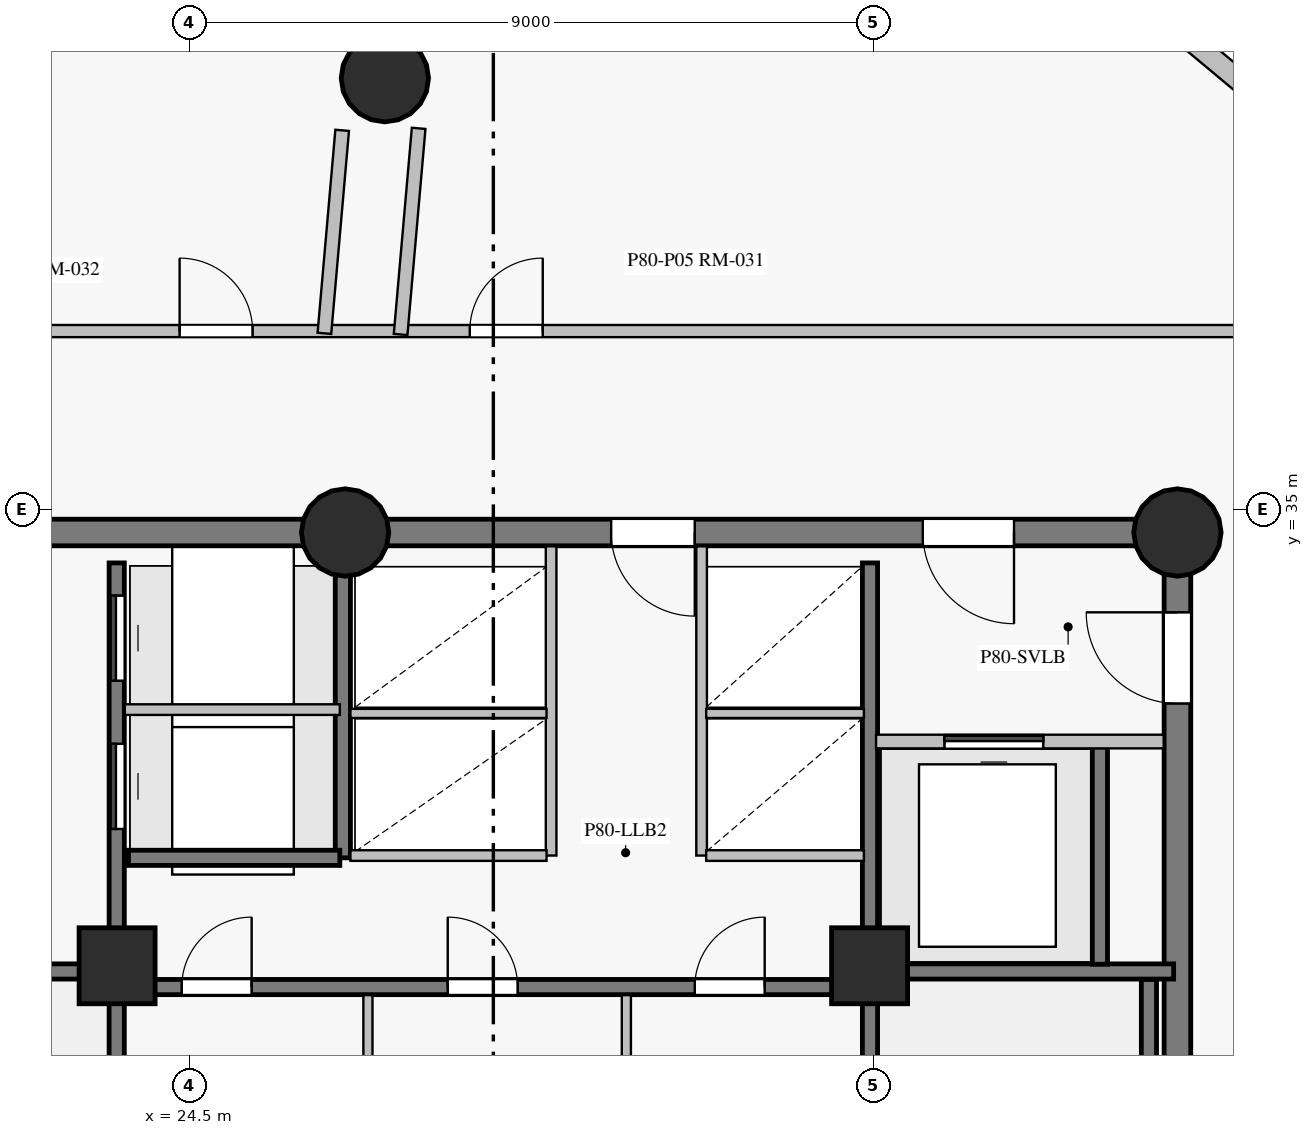
"""IFC4 building model, lengths in metres.
Left out: names, types, materials, properties, quantities, classifications, styles, units other than length and angle.
Written with IfcOpenShell. Run it as: python <this file> out.ifc"""

import sys

from ifc_helpers import new_model, si_unit, direction, frame, frame_2d, origin, origin_with_axes, origin_2d, place, context, subcontext, project, spatial, rectangle, circle, extrude, source, transform, mapped, element, fill, save


model = new_model("IFC4")
c1 = context("Model", 3, precision=1e-05, world=origin(), true_north=direction((0.0, 1.0)))
c2 = subcontext(c1, "Body", "Model", "MODEL_VIEW")
j1 = project(units=[si_unit("LENGTHUNIT", "METRE"), si_unit("PLANEANGLEUNIT", "RADIAN")], contexts=[c1])
p1 = place(None, origin())
s1 = spatial("IfcSite", under=j1, at=p1, CompositionType="ELEMENT")
p2 = place(p1, origin())
s2 = spatial("IfcBuilding", under=s1, at=p2, CompositionType="ELEMENT")
p3 = place(p2, frame((0.0, 0.0, 268.75)))
s3 = spatial("IfcBuildingStorey", under=s2, at=p3, CompositionType="ELEMENT", Elevation=268.75)
p4 = place(p3, frame((37.5, 18.3, 0.0), z_axis=(0.0, 0.0, 1.0), x_axis=(0.0, 1.0, 0.0)))
e1 = element("IfcWall", 1, at=p4, inside=s3, PredefinedType="SHEAR", context=c2, shape_type="SweptSolid", body=[
    extrude(rectangle(XDim=16.4, YDim=0.35, at=frame_2d((8.2, 0.0))), origin(), (0.0, 0.0, 1.0), 4.375),
])
p5 = place(p4, frame((14.15, 0.0, 0.0)))
e2 = element("IfcOpeningElement", 2, at=p5, cuts=e1, PredefinedType="OPENING", context=c2, shape_type="SweptSolid", body=[
    extrude(rectangle(XDim=1.2, YDim=2.15, at=frame_2d((0.6, 1.075))), frame((0.0, 0.185, 0.0), z_axis=(0.0, -1.0, 0.0), x_axis=(1.0, 0.0, 0.0)), (0.0, 0.0, 1.0), 0.37),
])
p6 = place(p3, frame((37.5, 34.7, 0.0), z_axis=(0.0, 0.0, 1.0), x_axis=(-1.0, 0.0, 0.0)))
e3 = element("IfcWall", 3, at=p6, inside=s3, PredefinedType="SHEAR", context=c2, shape_type="SweptSolid", body=[
    extrude(rectangle(XDim=10.95, YDim=0.35, at=frame_2d((5.475, 0.0))), origin(), (0.0, 0.0, 1.0), 4.375),
])
p7 = place(p6, frame((2.15, 0.0, 0.0)))
e4 = element("IfcOpeningElement", 4, at=p7, cuts=e3, PredefinedType="OPENING", context=c2, shape_type="SweptSolid", body=[
    extrude(rectangle(XDim=1.2, YDim=2.15, at=frame_2d((0.6, 1.075))), frame((0.0, 0.185, 0.0), z_axis=(0.0, -1.0, 0.0), x_axis=(1.0, 0.0, 0.0)), (0.0, 0.0, 1.0), 0.37),
])
p8 = place(p6, frame((6.35, 0.0, 0.0)))
e5 = element("IfcOpeningElement", 5, at=p8, cuts=e3, PredefinedType="OPENING", context=c2, shape_type="SweptSolid", body=[
    extrude(rectangle(XDim=1.1, YDim=2.15, at=frame_2d((0.55, 1.075))), frame((0.0, 0.185, 0.0), z_axis=(0.0, -1.0, 0.0), x_axis=(1.0, 0.0, 0.0)), (0.0, 0.0, 1.0), 0.37),
])
p9 = place(p3, frame((26.55, 34.7, 0.0), z_axis=(0.0, 0.0, 1.0), x_axis=(-1.0, 0.0, 0.0)))
e6 = element("IfcWall", 6, at=p9, inside=s3, PredefinedType="SHEAR", context=c2, shape_type="SweptSolid", body=[
    extrude(rectangle(XDim=7.05, YDim=0.35, at=frame_2d((3.525, 0.0))), origin(), (0.0, 0.0, 1.0), 4.375),
])
p10 = place(p9, frame((4.25, 0.0, 0.0)))
e7 = element("IfcOpeningElement", 7, at=p10, cuts=e6, PredefinedType="OPENING", context=c2, shape_type="SweptSolid", body=[
    extrude(rectangle(XDim=1.1, YDim=2.15, at=frame_2d((0.55, 1.075))), frame((0.0, 0.185, 0.0), z_axis=(0.0, -1.0, 0.0), x_axis=(1.0, 0.0, 0.0)), (0.0, 0.0, 1.0), 0.37),
])
m1 = source(origin_with_axes(), c2, "Body", "SweptSolid", [
    extrude(circle(Radius=0.575, at=origin_2d()), origin(), (0.0, 0.0, 1.0), 4.65),
])
for number, where, z_axis, x_axis in (
    (8, (26.55, 34.7, 0.0), (0.0, 0.0, 1.0), (1.0, 0.0, 0.0)),
    (9, (37.5, 34.7, 0.0), (0.0, 0.0, 1.0), (1.0, 0.0, 0.0)),
):
    element("IfcColumn", number, at=place(p3, frame(where, z_axis=z_axis, x_axis=x_axis)), inside=s3, PredefinedType="COLUMN", context=c2, shape_type="MappedRepresentation", body=[
        mapped(m1, transform((0.0, 0.0, 0.0), scale=1.0)),
    ])
m2 = source(origin_with_axes(), c2, "Body", "SweptSolid", [
    extrude(rectangle(XDim=1.0, YDim=1.0, at=origin_2d()), origin(), (0.0, 0.0, 1.0), 4.65),
])
for number, where, z_axis, x_axis in (
    (10, (23.55, 29.0, 0.0), (0.0, 0.0, 1.0), (1.0, 0.0, 0.0)),
    (11, (33.45, 29.0, 0.0), (0.0, 0.0, 1.0), (1.0, 0.0, 0.0)),
):
    element("IfcColumn", number, at=place(p3, frame(where, z_axis=z_axis, x_axis=x_axis)), inside=s3, PredefinedType="COLUMN", context=c2, shape_type="MappedRepresentation", body=[
        mapped(m2, transform((0.0, 0.0, 0.0), scale=1.0)),
    ])
p11 = place(p3, frame((27.073, 40.677, 0.0), z_axis=(0.0, 0.0, 1.0), x_axis=(1.0, 0.0, 0.0)))
e12 = element("IfcColumn", 12, at=p11, inside=s3, PredefinedType="COLUMN", context=c2, shape_type="MappedRepresentation", body=[
    mapped(m1, transform((0.0, 0.0, 0.0), scale=1.0)),
])
p12 = place(p3, frame((40.725, 38.631, 0.0), z_axis=(0.0, 0.0, 1.0), x_axis=(-0.767612607464, 0.640914101001, 0.0)))
e13 = element("IfcWall", 13, at=p12, inside=s3, PredefinedType="SOLIDWALL", context=c2, shape_type="SweptSolid", body=[
    extrude(rectangle(XDim=10.099, YDim=0.28, at=frame_2d((5.05, 0.0))), origin(), (0.0, 0.0, 1.0), 4.375),
])
p13 = place(p3, frame((24.393, 44.071, 0.0), z_axis=(0.0, 0.0, 1.0), x_axis=(-0.79188114586, -0.610675241706, 0.0)))
e14 = element("IfcWall", 14, at=p13, inside=s3, PredefinedType="SOLIDWALL", context=c2, shape_type="SweptSolid", body=[
    extrude(rectangle(XDim=11.836, YDim=0.28, at=frame_2d((5.918, 0.0))), origin(), (0.0, 0.0, 1.0), 4.375),
])
p14 = place(p3, frame((23.545, 18.7, 0.0), z_axis=(0.0, 0.0, 1.0), x_axis=(0.0, 1.0, 0.0)))
e15 = element("IfcWall", 15, at=p14, inside=s3, PredefinedType="SHEAR", context=c2, shape_type="SweptSolid", body=[
    extrude(rectangle(XDim=15.6, YDim=0.2, at=frame_2d((7.8, 0.0))), origin(), (0.0, 0.0, 1.0), 4.375),
])
p15 = place(p14, frame((2.75, 0.0, 0.0)))
e16 = element("IfcOpeningElement", 16, at=p15, cuts=e15, PredefinedType="OPENING", context=c2, shape_type="SweptSolid", body=[
    extrude(rectangle(XDim=1.15, YDim=2.15, at=frame_2d((0.575, 1.075))), frame((0.0, 0.11, 0.0), z_axis=(0.0, -1.0, 0.0), x_axis=(1.0, 0.0, 0.0)), (0.0, 0.0, 1.0), 0.22),
])
p16 = place(p14, frame((0.14, 0.0, 0.0)))
e17 = element("IfcOpeningElement", 17, at=p16, cuts=e15, PredefinedType="OPENING", context=c2, shape_type="SweptSolid", body=[
    extrude(rectangle(XDim=0.88, YDim=2.1, at=frame_2d((0.44, 1.05))), frame((0.0, 0.11, 0.0), z_axis=(0.0, -1.0, 0.0), x_axis=(1.0, 0.0, 0.0)), (0.0, 0.0, 1.0), 0.22),
])
p17 = place(p14, frame((1.36, 0.0, 0.0)))
e18 = element("IfcOpeningElement", 18, at=p17, cuts=e15, PredefinedType="OPENING", context=c2, shape_type="SweptSolid", body=[
    extrude(rectangle(XDim=0.88, YDim=2.1, at=frame_2d((0.44, 1.05))), frame((0.0, 0.11, 0.0), z_axis=(0.0, -1.0, 0.0), x_axis=(1.0, 0.0, 0.0)), (0.0, 0.0, 1.0), 0.22),
])
p18 = place(p14, frame((12.1, 0.0, 0.0)))
e19 = element("IfcOpeningElement", 19, at=p18, cuts=e15, PredefinedType="OPENING", context=c2, shape_type="SweptSolid", body=[
    extrude(rectangle(XDim=1.12, YDim=2.15, at=frame_2d((0.56, 1.075))), frame((0.0, 0.11, 0.0), z_axis=(0.0, -1.0, 0.0), x_axis=(1.0, 0.0, 0.0)), (0.0, 0.0, 1.0), 0.22),
])
p19 = place(p14, frame((14.05, 0.0, 0.0)))
e20 = element("IfcOpeningElement", 20, at=p19, cuts=e15, PredefinedType="OPENING", context=c2, shape_type="SweptSolid", body=[
    extrude(rectangle(XDim=1.12, YDim=2.15, at=frame_2d((0.56, 1.075))), frame((0.0, 0.11, 0.0), z_axis=(0.0, -1.0, 0.0), x_axis=(1.0, 0.0, 0.0)), (0.0, 0.0, 1.0), 0.22),
])
p20 = place(p3, frame((33.455, 18.7, 0.0), z_axis=(0.0, 0.0, 1.0), x_axis=(0.0, 1.0, 0.0)))
e21 = element("IfcWall", 21, at=p20, inside=s3, PredefinedType="SHEAR", context=c2, shape_type="SweptSolid", body=[
    extrude(rectangle(XDim=15.6, YDim=0.2, at=frame_2d((7.8, 0.0))), origin(), (0.0, 0.0, 1.0), 4.375),
])
p21 = place(p20, frame((2.75, 0.0, 0.0)))
e22 = element("IfcOpeningElement", 22, at=p21, cuts=e21, PredefinedType="OPENING", context=c2, shape_type="SweptSolid", body=[
    extrude(rectangle(XDim=1.15, YDim=2.15, at=frame_2d((0.575, 1.075))), frame((0.0, 0.11, 0.0), z_axis=(0.0, -1.0, 0.0), x_axis=(1.0, 0.0, 0.0)), (0.0, 0.0, 1.0), 0.22),
])
p22 = place(p20, frame((0.55, 0.0, 0.0)))
e23 = element("IfcOpeningElement", 23, at=p22, cuts=e21, PredefinedType="OPENING", context=c2, shape_type="SweptSolid", body=[
    extrude(rectangle(XDim=0.94, YDim=2.1, at=frame_2d((0.47, 1.05))), frame((0.0, 0.11, 0.0), z_axis=(0.0, -1.0, 0.0), x_axis=(1.0, 0.0, 0.0)), (0.0, 0.0, 1.0), 0.22),
])
p23 = place(p3, frame((23.7, 28.72, 0.0), z_axis=(0.0, 0.0, 1.0), x_axis=(1.0, 0.0, 0.0)))
e24 = element("IfcWall", 24, at=p23, inside=s3, PredefinedType="SHEAR", context=c2, shape_type="SweptSolid", body=[
    extrude(rectangle(XDim=9.6, YDim=0.2, at=frame_2d((4.8, 0.0))), origin(), (0.0, 0.0, 1.0), 4.375),
])
p24 = place(p23, frame((0.7, 0.0, 0.0)))
e25 = element("IfcOpeningElement", 25, at=p24, cuts=e24, PredefinedType="OPENING", context=c2, shape_type="SweptSolid", body=[
    extrude(rectangle(XDim=0.92, YDim=2.1, at=frame_2d((0.46, 1.05))), frame((0.0, 0.11, 0.0), z_axis=(0.0, -1.0, 0.0), x_axis=(1.0, 0.0, 0.0)), (0.0, 0.0, 1.0), 0.22),
])
p25 = place(p23, frame((4.2, 0.0, 0.0)))
e26 = element("IfcOpeningElement", 26, at=p25, cuts=e24, PredefinedType="OPENING", context=c2, shape_type="SweptSolid", body=[
    extrude(rectangle(XDim=0.92, YDim=2.1, at=frame_2d((0.46, 1.05))), frame((0.0, 0.11, 0.0), z_axis=(0.0, -1.0, 0.0), x_axis=(1.0, 0.0, 0.0)), (0.0, 0.0, 1.0), 0.22),
])
p26 = place(p23, frame((7.45, 0.0, 0.0)))
e27 = element("IfcOpeningElement", 27, at=p26, cuts=e24, PredefinedType="OPENING", context=c2, shape_type="SweptSolid", body=[
    extrude(rectangle(XDim=0.92, YDim=2.1, at=frame_2d((0.46, 1.05))), frame((0.0, 0.11, 0.0), z_axis=(0.0, -1.0, 0.0), x_axis=(1.0, 0.0, 0.0)), (0.0, 0.0, 1.0), 0.22),
])
p27 = place(p3, frame((37.125, 21.32, 0.0), z_axis=(0.0, 0.0, 1.0), x_axis=(0.0, 1.0, 0.0)))
e28 = element("IfcWall", 28, at=p27, inside=s3, PredefinedType="SHEAR", context=c2, shape_type="SweptSolid", body=[
    extrude(rectangle(XDim=7.5, YDim=0.2, at=frame_2d((3.75, 0.0))), origin(), (0.0, 0.0, 1.0), 4.375),
])
for number, where, z_axis, x_axis in (
    (29, (33.455, 28.925, 0.0), (0.0, 0.0, 1.0), (1.0, 0.0, 0.0)),
    (30, (19.55, 28.925, 0.0), (0.0, 0.0, 1.0), (1.0, 0.0, 0.0)),
):
    element("IfcWall", number, at=place(p3, frame(where, z_axis=z_axis, x_axis=x_axis)), inside=s3, PredefinedType="SHEAR", context=c2, shape_type="SweptSolid", body=[
        extrude(rectangle(XDim=3.995, YDim=0.2, at=frame_2d((1.998, 0.0))), origin(), (0.0, 0.0, 1.0), 4.375),
    ])
p28 = place(p3, frame((26.52, 30.42, 0.0), z_axis=(0.0, 0.0, 1.0), x_axis=(0.0, 1.0, 0.0)))
e31 = element("IfcWall", 31, at=p28, inside=s3, PredefinedType="SHEAR", context=c2, shape_type="SweptSolid", body=[
    extrude(rectangle(XDim=3.86, YDim=0.2, at=frame_2d((1.93, 0.0))), origin(), (0.0, 0.0, 1.0), 4.375),
])
p29 = place(p3, frame((36.48, 29.02, 0.0), z_axis=(0.0, 0.0, 1.0), x_axis=(0.0, 1.0, 0.0)))
e32 = element("IfcWall", 32, at=p29, inside=s3, PredefinedType="SHEAR", context=c2, shape_type="SweptSolid", body=[
    extrude(rectangle(XDim=2.86, YDim=0.2, at=frame_2d((1.43, 0.0))), origin(), (0.0, 0.0, 1.0), 4.375),
])
p30 = place(p3, frame((23.7, 30.42, 0.0), z_axis=(0.0, 0.0, 1.0), x_axis=(1.0, 0.0, 0.0)))
e33 = element("IfcWall", 33, at=p30, inside=s3, PredefinedType="SHEAR", context=c2, shape_type="SweptSolid", body=[
    extrude(rectangle(XDim=2.78, YDim=0.2, at=frame_2d((1.39, 0.0))), origin(), (0.0, 0.0, 1.0), 4.375),
])
p31 = place(p3, frame((16.5, 37.35, 0.0), z_axis=(0.0, 0.0, 1.0), x_axis=(1.0, 0.0, 0.0)))
e34 = element("IfcWall", 34, at=p31, inside=s3, PredefinedType="PARTITIONING", context=c2, shape_type="SweptSolid", body=[
    extrude(rectangle(XDim=23.85, YDim=0.16, at=frame_2d((11.925, 0.0))), origin(), (0.0, 0.0, 1.0), 3.475),
])
p32 = place(p31, frame((11.69, 0.0, 0.0)))
e35 = element("IfcOpeningElement", 35, at=p32, cuts=e34, PredefinedType="OPENING", context=c2, shape_type="SweptSolid", body=[
    extrude(rectangle(XDim=0.96, YDim=2.15, at=frame_2d((0.48, 1.075))), frame((0.0, 0.09, 0.0), z_axis=(0.0, -1.0, 0.0), x_axis=(1.0, 0.0, 0.0)), (0.0, 0.0, 1.0), 0.18),
])
p33 = place(p31, frame((7.873, 0.0, 0.0)))
e36 = element("IfcOpeningElement", 36, at=p33, cuts=e34, PredefinedType="OPENING", context=c2, shape_type="SweptSolid", body=[
    extrude(rectangle(XDim=0.96, YDim=2.15, at=frame_2d((0.48, 1.075))), frame((0.0, 0.09, 0.0), z_axis=(0.0, -1.0, 0.0), x_axis=(1.0, 0.0, 0.0)), (0.0, 0.0, 1.0), 0.18),
])
for number, where, z_axis, x_axis in (
    (37, (29.26, 30.45, 0.0), (0.0, 0.0, 1.0), (0.0, 1.0, 0.0)),
    (38, (31.24, 30.45, 0.0), (0.0, 0.0, 1.0), (0.0, 1.0, 0.0)),
):
    element("IfcWall", number, at=place(p3, frame(where, z_axis=z_axis, x_axis=x_axis)), inside=s3, PredefinedType="PARTITIONING", context=c2, shape_type="SweptSolid", body=[
        extrude(rectangle(XDim=4.068, YDim=0.14, at=frame_2d((2.034, 0.0))), origin(), (0.0, 0.0, 1.0), 4.375),
    ])
p34 = place(p3, frame((33.535, 31.95, 0.0), z_axis=(0.0, 0.0, 1.0), x_axis=(1.0, 0.0, 0.0)))
e39 = element("IfcWall", 39, at=p34, inside=s3, PredefinedType="PARTITIONING", context=c2, shape_type="SweptSolid", body=[
    extrude(rectangle(XDim=3.784, YDim=0.18, at=frame_2d((1.892, 0.0))), origin(), (0.0, 0.0, 1.0), 4.375),
])
p35 = place(p34, frame((0.9, 0.0, 0.0)))
e40 = element("IfcOpeningElement", 40, at=p35, cuts=e39, PredefinedType="OPENING", context=c2, shape_type="SweptSolid", body=[
    extrude(rectangle(XDim=1.3, YDim=2.2, at=frame_2d((0.65, 1.1))), frame((0.0, 0.1, 0.0), z_axis=(0.0, -1.0, 0.0), x_axis=(1.0, 0.0, 0.0)), (0.0, 0.0, 1.0), 0.2),
])
p36 = place(p3, frame((23.652, 32.37, 0.0), z_axis=(0.0, 0.0, 1.0), x_axis=(1.0, 0.0, 0.0)))
e41 = element("IfcWall", 41, at=p36, inside=s3, PredefinedType="PARTITIONING", context=c2, shape_type="SweptSolid", body=[
    extrude(rectangle(XDim=2.828, YDim=0.14, at=frame_2d((1.414, 0.0))), origin(), (0.0, 0.0, 1.0), 4.375),
])
p37 = place(p3, frame((27.28, 37.305, 0.0), z_axis=(0.0, 0.0, 1.0), x_axis=(0.087171400335, 0.996193328106, 0.0)))
e42 = element("IfcWall", 42, at=p37, inside=s3, PredefinedType="PARTITIONING", context=c2, shape_type="SweptSolid", body=[
    extrude(rectangle(XDim=2.722, YDim=0.18, at=frame_2d((1.361, 0.0))), origin(), (0.0, 0.0, 1.0), 3.475),
])
p38 = place(p3, frame((26.511, 39.991, 0.0), z_axis=(0.0, 0.0, 1.0), x_axis=(-0.087144358245, -0.996195694041, 0.0)))
e43 = element("IfcWall", 43, at=p38, inside=s3, PredefinedType="PARTITIONING", context=c2, shape_type="SweptSolid", body=[
    extrude(rectangle(XDim=2.681, YDim=0.18, at=frame_2d((1.341, 0.0))), origin(), (0.0, 0.0, 1.0), 3.475),
])
p39 = place(p3, frame((26.62, 30.45, 0.0), z_axis=(0.0, 0.0, 1.0), x_axis=(1.0, 0.0, 0.0)))
e44 = element("IfcWall", 44, at=p39, inside=s3, PredefinedType="PARTITIONING", context=c2, shape_type="SweptSolid", body=[
    extrude(rectangle(XDim=2.58, YDim=0.14, at=frame_2d((1.29, 0.0))), origin(), (0.0, 0.0, 1.0), 4.375),
])
p40 = place(p3, frame((26.62, 32.32, 0.0), z_axis=(0.0, 0.0, 1.0), x_axis=(1.0, 0.0, 0.0)))
e45 = element("IfcWall", 45, at=p40, inside=s3, PredefinedType="PARTITIONING", context=c2, shape_type="SweptSolid", body=[
    extrude(rectangle(XDim=2.58, YDim=0.12, at=frame_2d((1.29, 0.0))), origin(), (0.0, 0.0, 1.0), 4.375),
])
for number, where, z_axis, x_axis in (
    (46, (26.85, 26.027, 0.0), (0.0, 0.0, 1.0), (0.0, 1.0, 0.0)),
    (47, (30.25, 26.027, 0.0), (0.0, 0.0, 1.0), (0.0, 1.0, 0.0)),
):
    element("IfcWall", number, at=place(p3, frame(where, z_axis=z_axis, x_axis=x_axis)), inside=s3, PredefinedType="PARTITIONING", context=c2, shape_type="SweptSolid", body=[
        extrude(rectangle(XDim=2.587, YDim=0.12, at=frame_2d((1.293, 0.0))), origin(), (0.0, 0.0, 1.0), 4.375),
    ])
p41 = place(p3, frame((31.3, 30.45, 0.0), z_axis=(0.0, 0.0, 1.0), x_axis=(1.0, 0.0, 0.0)))
e48 = element("IfcWall", 48, at=p41, inside=s3, PredefinedType="PARTITIONING", context=c2, shape_type="SweptSolid", body=[
    extrude(rectangle(XDim=2.075, YDim=0.14, at=frame_2d((1.038, 0.0))), origin(), (0.0, 0.0, 1.0), 4.375),
])
p42 = place(p3, frame((31.3, 32.32, 0.0), z_axis=(0.0, 0.0, 1.0), x_axis=(1.0, 0.0, 0.0)))
e49 = element("IfcWall", 49, at=p42, inside=s3, PredefinedType="PARTITIONING", context=c2, shape_type="SweptSolid", body=[
    extrude(rectangle(XDim=2.075, YDim=0.12, at=frame_2d((1.038, 0.0))), origin(), (0.0, 0.0, 1.0), 4.375),
])
m3 = source(origin_with_axes(), c2, "Body", "SweptSolid", [
    extrude(rectangle(XDim=1.2, YDim=2.15, at=frame_2d((0.6, 1.075))), frame((0.0, 0.025, 0.0), z_axis=(0.0, -1.0, 0.0), x_axis=(1.0, 0.0, 0.0)), (0.0, 0.0, 1.0), 0.05),
])
p43 = place(p5, origin())
e50 = element("IfcDoor", 50, at=p43, inside=s3, OperationType="SINGLE_SWING_RIGHT", PredefinedType="DOOR", context=c2, shape_type="MappedRepresentation", body=[
    mapped(m3, transform((0.0, 0.0, 0.0), scale=1.0)),
])
fill(e2, e50)
p44 = place(p7, origin())
e51 = element("IfcDoor", 51, at=p44, inside=s3, OperationType="SINGLE_SWING_LEFT", PredefinedType="DOOR", context=c2, shape_type="MappedRepresentation", body=[
    mapped(m3, transform((0.0, 0.0, 0.0), scale=1.0)),
])
fill(e4, e51)
m4 = source(origin_with_axes(), c2, "Body", "SweptSolid", [
    extrude(rectangle(XDim=1.3, YDim=2.2, at=frame_2d((0.65, 1.1))), frame((0.0, 0.025, 0.0), z_axis=(0.0, -1.0, 0.0), x_axis=(1.0, 0.0, 0.0)), (0.0, 0.0, 1.0), 0.05),
])
p45 = place(p35, origin())
e52 = element("IfcDoor", 52, at=p45, inside=s3, OperationType="SLIDING_TO_LEFT", PredefinedType="DOOR", context=c2, shape_type="MappedRepresentation", body=[
    mapped(m4, transform((0.0, 0.0, 0.0), scale=1.0)),
])
fill(e40, e52)
m5 = source(origin_with_axes(), c2, "Body", "SweptSolid", [
    extrude(rectangle(XDim=0.92, YDim=2.1, at=frame_2d((0.46, 1.05))), frame((0.0, 0.025, 0.0), z_axis=(0.0, -1.0, 0.0), x_axis=(1.0, 0.0, 0.0)), (0.0, 0.0, 1.0), 0.05),
])
p46 = place(p24, origin())
e53 = element("IfcDoor", 53, at=p46, inside=s3, OperationType="SINGLE_SWING_RIGHT", PredefinedType="DOOR", context=c2, shape_type="MappedRepresentation", body=[
    mapped(m5, transform((0.0, 0.0, 0.0), scale=1.0)),
])
fill(e25, e53)
p47 = place(p25, origin())
e54 = element("IfcDoor", 54, at=p47, inside=s3, OperationType="SINGLE_SWING_LEFT", PredefinedType="DOOR", context=c2, shape_type="MappedRepresentation", body=[
    mapped(m5, transform((0.0, 0.0, 0.0), scale=1.0)),
])
fill(e26, e54)
p48 = place(p26, origin())
e55 = element("IfcDoor", 55, at=p48, inside=s3, OperationType="SINGLE_SWING_RIGHT", PredefinedType="DOOR", context=c2, shape_type="MappedRepresentation", body=[
    mapped(m5, transform((0.0, 0.0, 0.0), scale=1.0)),
])
fill(e27, e55)
m6 = source(origin_with_axes(), c2, "Body", "SweptSolid", [
    extrude(rectangle(XDim=1.1, YDim=2.15, at=frame_2d((0.55, 1.075))), frame((0.0, 0.025, 0.0), z_axis=(0.0, -1.0, 0.0), x_axis=(1.0, 0.0, 0.0)), (0.0, 0.0, 1.0), 0.05),
])
p49 = place(p8, origin())
e56 = element("IfcDoor", 56, at=p49, inside=s3, OperationType="SINGLE_SWING_LEFT", PredefinedType="DOOR", context=c2, shape_type="MappedRepresentation", body=[
    mapped(m6, transform((0.0, 0.0, 0.0), scale=1.0)),
])
fill(e5, e56)
m7 = source(origin_with_axes(), c2, "Body", "SweptSolid", [
    extrude(rectangle(XDim=1.12, YDim=2.15, at=frame_2d((0.56, 1.075))), frame((0.0, 0.025, 0.0), z_axis=(0.0, -1.0, 0.0), x_axis=(1.0, 0.0, 0.0)), (0.0, 0.0, 1.0), 0.05),
])
p50 = place(p18, origin())
e57 = element("IfcDoor", 57, at=p50, inside=s3, OperationType="SLIDING_TO_LEFT", PredefinedType="DOOR", context=c2, shape_type="MappedRepresentation", body=[
    mapped(m7, transform((0.0, 0.0, 0.0), scale=1.0)),
])
fill(e19, e57)
p51 = place(p19, origin())
e58 = element("IfcDoor", 58, at=p51, inside=s3, OperationType="SLIDING_TO_RIGHT", PredefinedType="DOOR", context=c2, shape_type="MappedRepresentation", body=[
    mapped(m7, transform((0.0, 0.0, 0.0), scale=1.0)),
])
fill(e20, e58)
m8 = source(origin_with_axes(), c2, "Body", "SweptSolid", [
    extrude(rectangle(XDim=0.96, YDim=2.15, at=frame_2d((0.48, 1.075))), frame((0.0, 0.025, 0.0), z_axis=(0.0, -1.0, 0.0), x_axis=(1.0, 0.0, 0.0)), (0.0, 0.0, 1.0), 0.05),
])
p52 = place(p32, origin())
e59 = element("IfcDoor", 59, at=p52, inside=s3, OperationType="SINGLE_SWING_RIGHT", PredefinedType="DOOR", context=c2, shape_type="MappedRepresentation", body=[
    mapped(m8, transform((0.0, 0.0, 0.0), scale=1.0)),
])
fill(e35, e59)
p53 = place(p33, origin())
e60 = element("IfcDoor", 60, at=p53, inside=s3, OperationType="SINGLE_SWING_LEFT", PredefinedType="DOOR", context=c2, shape_type="MappedRepresentation", body=[
    mapped(m8, transform((0.0, 0.0, 0.0), scale=1.0)),
])
fill(e36, e60)
save(model, sys.argv[1])
